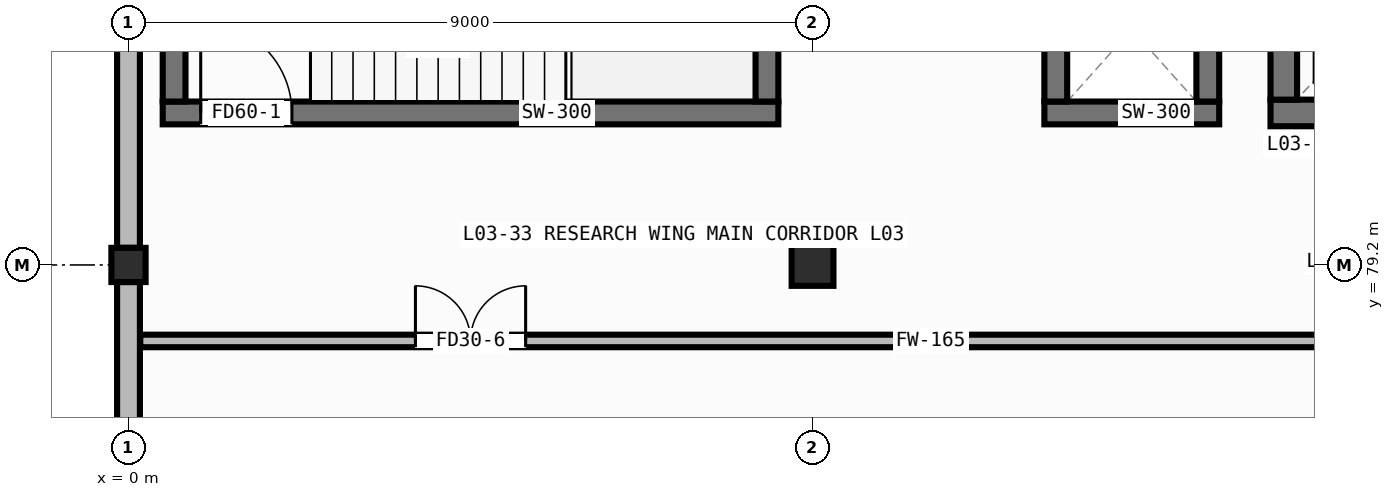
"""IFC4 building model, lengths in metres.
Left out: names, types, materials, properties, quantities, classifications, styles, units other than length and angle.
Written with IfcOpenShell. Run it as: python <this file> out.ifc"""

import sys

from ifc_helpers import new_model, si_unit, direction, frame, frame_2d, origin, origin_2d, place, context, subcontext, project, spatial, rectangle, hollow_rectangle, extrude, element, fill, save


model = new_model("IFC4")
c1 = context("Model", 3, precision=1e-05, world=origin(), true_north=direction((0.0, 1.0)))
c2 = subcontext(c1, "Body", "Model", "MODEL_VIEW")
j1 = project(units=[si_unit("LENGTHUNIT", "METRE"), si_unit("PLANEANGLEUNIT", "RADIAN")], contexts=[c1])
p1 = place(None, origin())
s1 = spatial("IfcSite", under=j1, at=p1, CompositionType="ELEMENT")
p2 = place(p1, origin())
s2 = spatial("IfcBuilding", under=s1, at=p2, CompositionType="ELEMENT")
p3 = place(p2, frame((0.0, 0.0, 8.8)))
s3 = spatial("IfcBuildingStorey", under=s2, at=p3, CompositionType="ELEMENT", Elevation=8.8)
p4 = place(p3, frame((0.0, 79.2, 0.0), z_axis=(0.0, 0.0, 1.0), x_axis=(1.0, 0.0, 0.0)))
e1 = element("IfcColumn", 1, at=p4, inside=s3, PredefinedType="COLUMN", context=c2, shape_type="SweptSolid", body=[
    extrude(hollow_rectangle(XDim=0.45, YDim=0.45, WallThickness=0.019, at=origin_2d()), origin(), (0.0, 0.0, 1.0), 4.0),
])
p5 = place(p3, frame((9.0, 79.2, 0.0), z_axis=(0.0, 0.0, 1.0), x_axis=(1.0, 0.0, 0.0)))
e2 = element("IfcColumn", 2, at=p5, inside=s3, PredefinedType="COLUMN", context=c2, shape_type="SweptSolid", body=[
    extrude(hollow_rectangle(XDim=0.55, YDim=0.55, WallThickness=0.022, at=origin_2d()), origin(), (0.0, 0.0, 1.0), 4.0),
])
p6 = place(p3, frame((0.0, 72.225, 0.0), z_axis=(0.0, 0.0, 1.0), x_axis=(0.0, 1.0, 0.0)))
e3 = element("IfcWall", 3, at=p6, inside=s3, PredefinedType="STANDARD", context=c2, shape_type="SweptSolid", body=[
    extrude(rectangle(XDim=6.75, YDim=0.3, at=frame_2d((3.375, 0.0))), origin(), (0.0, 0.0, 1.0), 3.295),
])
p7 = place(p6, frame((2.075, 0.0, 0.85)))
e4 = element("IfcOpeningElement", 4, at=p7, cuts=e3, PredefinedType="OPENING", context=c2, shape_type="SweptSolid", body=[
    extrude(rectangle(XDim=2.6, YDim=1.6, at=frame_2d((1.3, 0.8))), frame((0.0, 0.162, 0.0), z_axis=(0.0, -1.0, 0.0), x_axis=(1.0, 0.0, 0.0)), (0.0, 0.0, 1.0), 0.324),
])
p8 = place(p3, frame((0.0, 79.425, 0.0), z_axis=(0.0, 0.0, 1.0), x_axis=(0.0, 1.0, 0.0)))
e5 = element("IfcWall", 5, at=p8, inside=s3, PredefinedType="STANDARD", context=c2, shape_type="SweptSolid", body=[
    extrude(rectangle(XDim=6.75, YDim=0.3, at=frame_2d((3.375, 0.0))), origin(), (0.0, 0.0, 1.0), 3.295),
])
p9 = place(p3, frame((0.45, 81.2, 0.0), z_axis=(0.0, 0.0, 1.0), x_axis=(1.0, 0.0, 0.0)))
e6 = element("IfcWall", 6, at=p9, inside=s3, PredefinedType="SHEAR", context=c2, shape_type="SweptSolid", body=[
    extrude(rectangle(XDim=8.1, YDim=0.3, at=frame_2d((4.05, 0.0))), origin(), (0.0, 0.0, 1.0), 3.745),
])
p10 = place(p9, frame((0.5, 0.0, 0.0)))
e7 = element("IfcOpeningElement", 7, at=p10, cuts=e6, PredefinedType="OPENING", context=c2, shape_type="SweptSolid", body=[
    extrude(rectangle(XDim=1.2, YDim=2.1, at=frame_2d((0.6, 1.05))), frame((0.0, 0.162, 0.0), z_axis=(0.0, -1.0, 0.0), x_axis=(1.0, 0.0, 0.0)), (0.0, 0.0, 1.0), 0.324),
])
for number, where, z_axis, x_axis in (
    (8, (0.6, 81.35, 0.0), (0.0, 0.0, 1.0), (0.0, 1.0, 0.0)),
    (9, (8.4, 81.35, 0.0), (0.0, 0.0, 1.0), (0.0, 1.0, 0.0)),
):
    element("IfcWall", number, at=place(p3, frame(where, z_axis=z_axis, x_axis=x_axis)), inside=s3, PredefinedType="SHEAR", context=c2, shape_type="SweptSolid", body=[
        extrude(rectangle(XDim=3.8, YDim=0.3, at=frame_2d((1.9, 0.0))), origin(), (0.0, 0.0, 1.0), 3.745),
    ])
p11 = place(p3, frame((15.025, 81.2, 0.0), z_axis=(0.0, 0.0, 1.0), x_axis=(1.0, 0.0, 0.0)))
e10 = element("IfcWall", 10, at=p11, inside=s3, PredefinedType="SHEAR", context=c2, shape_type="SweptSolid", body=[
    extrude(rectangle(XDim=2.75, YDim=0.35, at=frame_2d((1.375, 0.0))), origin(), (0.0, 0.0, 1.0), 3.745),
])
p12 = place(p11, frame((0.825, 0.0, 0.0)))
e11 = element("IfcOpeningElement", 11, at=p12, cuts=e10, PredefinedType="OPENING", context=c2, shape_type="SweptSolid", body=[
    extrude(rectangle(XDim=1.1, YDim=2.1, at=frame_2d((0.55, 1.05))), frame((0.0, 0.187, 0.0), z_axis=(0.0, -1.0, 0.0), x_axis=(1.0, 0.0, 0.0)), (0.0, 0.0, 1.0), 0.374),
])
p13 = place(p3, frame((15.2, 81.375, 0.0), z_axis=(0.0, 0.0, 1.0), x_axis=(0.0, 1.0, 0.0)))
e12 = element("IfcWall", 12, at=p13, inside=s3, PredefinedType="SHEAR", context=c2, shape_type="SweptSolid", body=[
    extrude(rectangle(XDim=2.25, YDim=0.35, at=frame_2d((1.125, 0.0))), origin(), (0.0, 0.0, 1.0), 3.745),
])
p14 = place(p3, frame((12.05, 81.2, 0.0), z_axis=(0.0, 0.0, 1.0), x_axis=(1.0, 0.0, 0.0)))
e13 = element("IfcWall", 13, at=p14, inside=s3, PredefinedType="SHEAR", context=c2, shape_type="SweptSolid", body=[
    extrude(rectangle(XDim=2.3, YDim=0.3, at=frame_2d((1.15, 0.0))), origin(), (0.0, 0.0, 1.0), 3.745),
])
for number, where, z_axis, x_axis in (
    (14, (12.2, 81.35, 0.0), (0.0, 0.0, 1.0), (0.0, 1.0, 0.0)),
    (15, (14.2, 81.35, 0.0), (0.0, 0.0, 1.0), (0.0, 1.0, 0.0)),
):
    element("IfcWall", number, at=place(p3, frame(where, z_axis=z_axis, x_axis=x_axis)), inside=s3, PredefinedType="SHEAR", context=c2, shape_type="SweptSolid", body=[
        extrude(rectangle(XDim=1.9, YDim=0.3, at=frame_2d((0.95, 0.0))), origin(), (0.0, 0.0, 1.0), 3.745),
    ])
p15 = place(p3, frame((0.155, 78.2, 0.0), z_axis=(0.0, 0.0, 1.0), x_axis=(1.0, 0.0, 0.0)))
e16 = element("IfcWall", 16, at=p15, inside=s3, PredefinedType="PARTITIONING", context=c2, shape_type="SweptSolid", body=[
    extrude(rectangle(XDim=16.245, YDim=0.165, at=frame_2d((8.123, 0.0))), origin(), (0.0, 0.0, 1.0), 3.745),
])
p16 = place(p15, frame((3.62, 0.0, 0.0)))
e17 = element("IfcOpeningElement", 17, at=p16, cuts=e16, PredefinedType="OPENING", context=c2, shape_type="SweptSolid", body=[
    extrude(rectangle(XDim=1.45, YDim=2.1, at=frame_2d((0.725, 1.05))), frame((0.0, 0.094, 0.0), z_axis=(0.0, -1.0, 0.0), x_axis=(1.0, 0.0, 0.0)), (0.0, 0.0, 1.0), 0.189),
])
p17 = place(p10, origin())
e18 = element("IfcDoor", 18, at=p17, inside=s3, OperationType="SINGLE_SWING_LEFT", PredefinedType="DOOR", context=c2, shape_type="SweptSolid", body=[
    extrude(rectangle(XDim=1.2, YDim=2.1, at=frame_2d((0.6, 1.05))), frame((0.0, 0.025, 0.0), z_axis=(0.0, -1.0, 0.0), x_axis=(1.0, 0.0, 0.0)), (0.0, 0.0, 1.0), 0.05),
])
fill(e7, e18)
p18 = place(p16, origin())
e19 = element("IfcDoor", 19, at=p18, inside=s3, OperationType="DOUBLE_DOOR_SINGLE_SWING", PredefinedType="DOOR", context=c2, shape_type="SweptSolid", body=[
    extrude(rectangle(XDim=1.45, YDim=2.1, at=frame_2d((0.725, 1.05))), frame((0.0, 0.025, 0.0), z_axis=(0.0, -1.0, 0.0), x_axis=(1.0, 0.0, 0.0)), (0.0, 0.0, 1.0), 0.05),
])
fill(e17, e19)
save(model, sys.argv[1])
